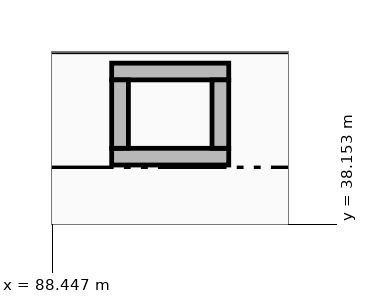
"""IFC4 building model, lengths in metres.
Left out: names, types, materials, properties, quantities, classifications, styles, units other than length and angle.
Written with IfcOpenShell. Run it as: python <this file> out.ifc"""

import sys

from ifc_helpers import new_model, si_unit, direction, frame, frame_2d, origin, place, context, subcontext, project, spatial, rectangle, extrude, element, save


model = new_model("IFC4")
c1 = context("Model", 3, precision=1e-05, world=origin(), true_north=direction((0.0, 1.0)))
c2 = subcontext(c1, "Body", "Model", "MODEL_VIEW")
j1 = project(units=[si_unit("LENGTHUNIT", "METRE"), si_unit("PLANEANGLEUNIT", "RADIAN")], contexts=[c1])
p1 = place(None, origin())
s1 = spatial("IfcSite", under=j1, at=p1, CompositionType="ELEMENT")
p2 = place(p1, origin())
s2 = spatial("IfcBuilding", under=s1, at=p2, CompositionType="ELEMENT")
p3 = place(p2, frame((0.0, 0.0, 9.0)))
s3 = spatial("IfcBuildingStorey", under=s2, at=p3, CompositionType="ELEMENT", Elevation=9.0)
for number, where, z_axis, x_axis in (
    (1, (89.23, 39.04, 0.0), (0.0, 0.0, 1.0), (1.0, 0.0, 0.0)),
    (2, (89.23, 40.16, 0.0), (0.0, 0.0, 1.0), (1.0, 0.0, 0.0)),
):
    element("IfcWall", number, at=place(p3, frame(where, z_axis=z_axis, x_axis=x_axis)), inside=s3, PredefinedType="STANDARD", context=c2, shape_type="SweptSolid", body=[
        extrude(rectangle(XDim=1.54, YDim=0.22, at=frame_2d((0.77, 0.0))), origin(), (0.0, 0.0, 1.0), 3.26),
    ])
for number, where, z_axis, x_axis in (
    (3, (89.34, 39.15, 0.0), (0.0, 0.0, 1.0), (0.0, 1.0, 0.0)),
    (4, (90.66, 39.15, 0.0), (0.0, 0.0, 1.0), (0.0, 1.0, 0.0)),
):
    element("IfcWall", number, at=place(p3, frame(where, z_axis=z_axis, x_axis=x_axis)), inside=s3, PredefinedType="STANDARD", context=c2, shape_type="SweptSolid", body=[
        extrude(rectangle(XDim=0.9, YDim=0.22, at=frame_2d((0.45, 0.0))), origin(), (0.0, 0.0, 1.0), 3.26),
    ])
save(model, sys.argv[1])
